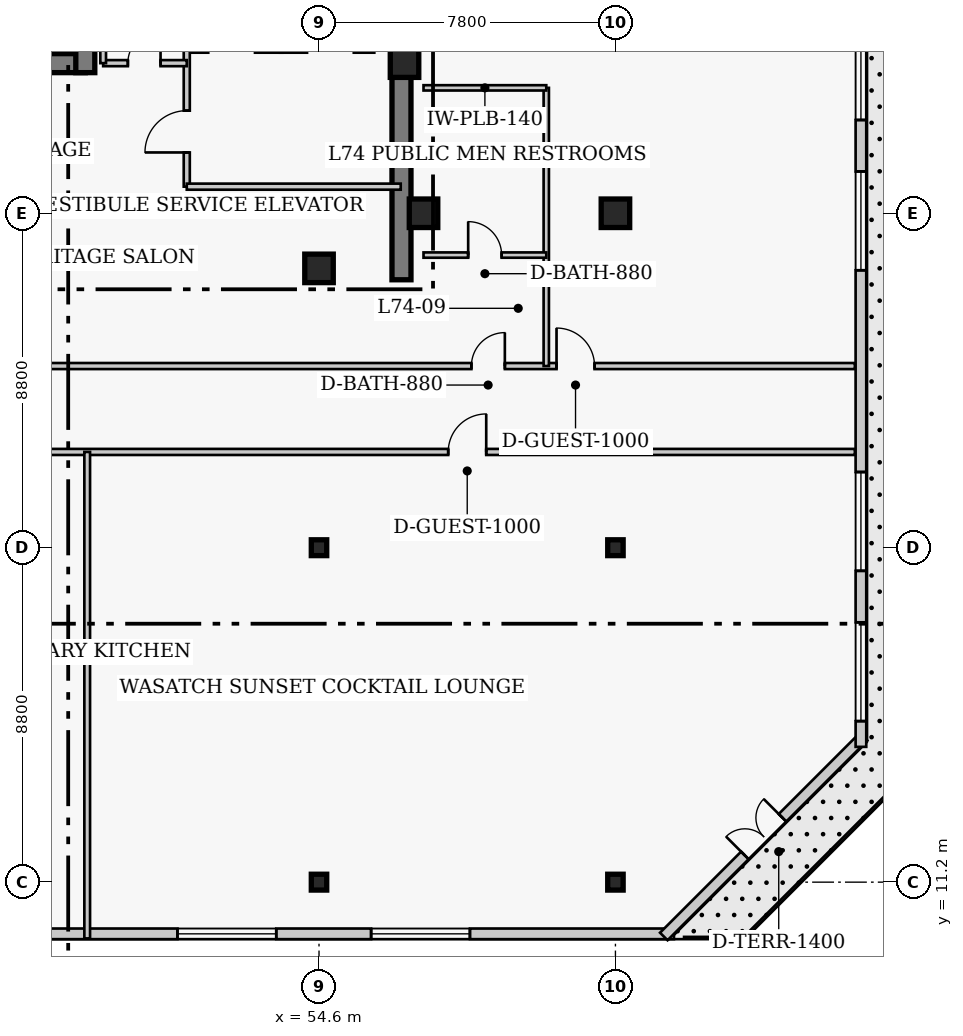
"""IFC4 building model, lengths in metres.
Left out: names, types, materials, properties, quantities, classifications, styles, units other than length and angle.
Written with IfcOpenShell. Run it as: python <this file> out.ifc"""

import sys

from ifc_helpers import new_model, si_unit, direction, frame, frame_2d, origin, origin_2d, place, context, subcontext, project, spatial, rectangle, i_section, extrude, element, fill, save


model = new_model("IFC4")
c1 = context("Model", 3, precision=1e-05, world=origin(), true_north=direction((0.0, 1.0)))
c2 = subcontext(c1, "Body", "Model", "MODEL_VIEW")
j1 = project(units=[si_unit("LENGTHUNIT", "METRE"), si_unit("PLANEANGLEUNIT", "RADIAN")], contexts=[c1])
p1 = place(None, origin())
s1 = spatial("IfcSite", under=j1, at=p1, CompositionType="ELEMENT")
p2 = place(p1, origin())
s2 = spatial("IfcBuilding", under=s1, at=p2, CompositionType="ELEMENT")
p3 = place(p2, frame((0.0, 0.0, 297.4)))
s3 = spatial("IfcBuildingStorey", under=s2, at=p3, CompositionType="ELEMENT", Elevation=297.4)
p4 = place(p3, frame((56.77, 27.05, 0.0), z_axis=(0.0, 0.0, 1.0), x_axis=(0.0, 1.0, 0.0)))
e1 = element("IfcWall", 1, at=p4, inside=s3, PredefinedType="SHEAR", context=c2, shape_type="SweptSolid", body=[
    extrude(rectangle(XDim=13.52, YDim=0.5, at=frame_2d((6.76, 0.0))), origin(), (0.0, 0.0, 1.0), 4.6),
])
p5 = place(p3, frame((45.81, 32.75, 0.0), z_axis=(0.0, 0.0, 1.0), x_axis=(1.0, 0.0, 0.0)))
e2 = element("IfcWall", 2, at=p5, inside=s3, PredefinedType="SHEAR", context=c2, shape_type="SweptSolid", body=[
    extrude(rectangle(XDim=2.64, YDim=0.5, at=frame_2d((1.32, 0.0))), origin(), (0.0, 0.0, 1.0), 4.6),
])
p6 = place(p3, frame((48.45, 32.5, 0.0), z_axis=(0.0, 0.0, 1.0), x_axis=(0.0, 1.0, 0.0)))
e3 = element("IfcWall", 3, at=p6, inside=s3, PredefinedType="SHEAR", context=c2, shape_type="SweptSolid", body=[
    extrude(rectangle(XDim=7.82, YDim=0.5, at=frame_2d((3.91, 0.0))), origin(), (0.0, 0.0, 1.0), 4.6),
])
p7 = place(p6, frame((5.7, 0.0, 0.0)))
e4 = element("IfcOpeningElement", 4, at=p7, cuts=e3, PredefinedType="OPENING", context=c2, shape_type="SweptSolid", body=[
    extrude(rectangle(XDim=1.1, YDim=2.15, at=frame_2d((0.55, 1.075))), frame((0.0, 0.26, 0.0), z_axis=(0.0, -1.0, 0.0), x_axis=(1.0, 0.0, 0.0)), (0.0, 0.0, 1.0), 0.52),
])
for number, where, z_axis, x_axis in (
    (5, (54.6, 11.2, 0.0), (0.0, 0.0, 1.0), (1.0, 0.0, 0.0)),
    (6, (54.6, 20.0, 0.0), (0.0, 0.0, 1.0), (1.0, 0.0, 0.0)),
    (7, (62.4, 11.2, 0.0), (0.0, 0.0, 1.0), (1.0, 0.0, 0.0)),
    (8, (62.4, 20.0, 0.0), (0.0, 0.0, 1.0), (1.0, 0.0, 0.0)),
):
    element("IfcColumn", number, at=place(p3, frame(where, z_axis=z_axis, x_axis=x_axis)), inside=s3, PredefinedType="COLUMN", context=c2, shape_type="SweptSolid", body=[
        extrude(i_section(OverallWidth=0.406, OverallDepth=0.417, WebThickness=0.03, FlangeThickness=0.048, FilletRadius=0.017, at=origin_2d()), origin(), (0.0, 0.0, 1.0), 4.6),
    ])
for number, where, z_axis, x_axis in (
    (9, (62.4, 28.8, 0.0), (0.0, 0.0, 1.0), (1.0, 0.0, 0.0)),
    (10, (57.35, 28.8, 0.0), (0.0, 0.0, 1.0), (1.0, 0.0, 0.0)),
    (11, (54.6, 27.35, 0.0), (0.0, 0.0, 1.0), (1.0, 0.0, 0.0)),
    (12, (56.85, 32.75, 0.0), (0.0, 0.0, 1.0), (1.0, 0.0, 0.0)),
):
    element("IfcColumn", number, at=place(p3, frame(where, z_axis=z_axis, x_axis=x_axis)), inside=s3, PredefinedType="COLUMN", context=c2, shape_type="SweptSolid", body=[
        extrude(rectangle(XDim=0.75, YDim=0.75, at=origin_2d()), origin(), (0.0, 0.0, 1.0), 4.6),
    ])
p8 = place(p3, frame((41.71, 9.84, 0.0), z_axis=(0.0, 0.0, 1.0), x_axis=(1.0, 0.0, 0.0)))
e13 = element("IfcWall", 13, at=p8, inside=s3, PredefinedType="SOLIDWALL", context=c2, shape_type="SweptSolid", body=[
    extrude(rectangle(XDim=22.23, YDim=0.28, at=frame_2d((11.115, 0.0))), origin(), (0.0, 0.0, 1.0), 4.31),
])
p9 = place(p8, frame((0.923, 0.0, 0.65)))
e14 = element("IfcOpeningElement", 14, at=p9, cuts=e13, PredefinedType="OPENING", context=c2, shape_type="SweptSolid", body=[
    extrude(rectangle(XDim=2.6, YDim=2.2, at=frame_2d((1.3, 1.1))), frame((0.0, 0.15, 0.0), z_axis=(0.0, -1.0, 0.0), x_axis=(1.0, 0.0, 0.0)), (0.0, 0.0, 1.0), 0.3),
])
p10 = place(p8, frame((9.165, 0.0, 0.65)))
e15 = element("IfcOpeningElement", 15, at=p10, cuts=e13, PredefinedType="OPENING", context=c2, shape_type="SweptSolid", body=[
    extrude(rectangle(XDim=2.6, YDim=2.2, at=frame_2d((1.3, 1.1))), frame((0.0, 0.15, 0.0), z_axis=(0.0, -1.0, 0.0), x_axis=(1.0, 0.0, 0.0)), (0.0, 0.0, 1.0), 0.3),
])
p11 = place(p8, frame((14.261, 0.0, 0.65)))
e16 = element("IfcOpeningElement", 16, at=p11, cuts=e13, PredefinedType="OPENING", context=c2, shape_type="SweptSolid", body=[
    extrude(rectangle(XDim=2.6, YDim=2.2, at=frame_2d((1.3, 1.1))), frame((0.0, 0.15, 0.0), z_axis=(0.0, -1.0, 0.0), x_axis=(1.0, 0.0, 0.0)), (0.0, 0.0, 1.0), 0.3),
])
p12 = place(p3, frame((63.673, 9.771, 0.0), z_axis=(0.0, 0.0, 1.0), x_axis=(0.707106781187, 0.707106781187, 0.0)))
e17 = element("IfcWall", 17, at=p12, inside=s3, PredefinedType="SOLIDWALL", context=c2, shape_type="SweptSolid", body=[
    extrude(rectangle(XDim=7.434, YDim=0.28, at=frame_2d((3.717, 0.0))), origin(), (0.0, 0.0, 1.0), 4.31),
])
p13 = place(p12, frame((3.017, 0.0, 0.0)))
e18 = element("IfcOpeningElement", 18, at=p13, cuts=e17, PredefinedType="OPENING", context=c2, shape_type="SweptSolid", body=[
    extrude(rectangle(XDim=1.4, YDim=2.15, at=frame_2d((0.7, 1.075))), frame((0.0, 0.15, 0.0), z_axis=(0.0, -1.0, 0.0), x_axis=(1.0, 0.0, 0.0)), (0.0, 0.0, 1.0), 0.3),
])
p14 = place(p3, frame((68.86, 14.76, 0.0), z_axis=(0.0, 0.0, 1.0), x_axis=(0.0, 1.0, 0.0)))
e19 = element("IfcWall", 19, at=p14, inside=s3, PredefinedType="SOLIDWALL", context=c2, shape_type="SweptSolid", body=[
    extrude(rectangle(XDim=27.68, YDim=0.28, at=frame_2d((13.84, 0.0))), origin(), (0.0, 0.0, 1.0), 4.31),
])
p15 = place(p14, frame((0.677, 0.0, 0.65)))
e20 = element("IfcOpeningElement", 20, at=p15, cuts=e19, PredefinedType="OPENING", context=c2, shape_type="SweptSolid", body=[
    extrude(rectangle(XDim=2.6, YDim=2.2, at=frame_2d((1.3, 1.1))), frame((0.0, 0.15, 0.0), z_axis=(0.0, -1.0, 0.0), x_axis=(1.0, 0.0, 0.0)), (0.0, 0.0, 1.0), 0.3),
])
p16 = place(p14, frame((4.631, 0.0, 0.65)))
e21 = element("IfcOpeningElement", 21, at=p16, cuts=e19, PredefinedType="OPENING", context=c2, shape_type="SweptSolid", body=[
    extrude(rectangle(XDim=2.6, YDim=2.2, at=frame_2d((1.3, 1.1))), frame((0.0, 0.15, 0.0), z_axis=(0.0, -1.0, 0.0), x_axis=(1.0, 0.0, 0.0)), (0.0, 0.0, 1.0), 0.3),
])
p17 = place(p14, frame((12.54, 0.0, 0.65)))
e22 = element("IfcOpeningElement", 22, at=p17, cuts=e19, PredefinedType="OPENING", context=c2, shape_type="SweptSolid", body=[
    extrude(rectangle(XDim=2.6, YDim=2.2, at=frame_2d((1.3, 1.1))), frame((0.0, 0.15, 0.0), z_axis=(0.0, -1.0, 0.0), x_axis=(1.0, 0.0, 0.0)), (0.0, 0.0, 1.0), 0.3),
])
p18 = place(p14, frame((16.494, 0.0, 0.65)))
e23 = element("IfcOpeningElement", 23, at=p18, cuts=e19, PredefinedType="OPENING", context=c2, shape_type="SweptSolid", body=[
    extrude(rectangle(XDim=2.6, YDim=2.2, at=frame_2d((1.3, 1.1))), frame((0.0, 0.15, 0.0), z_axis=(0.0, -1.0, 0.0), x_axis=(1.0, 0.0, 0.0)), (0.0, 0.0, 1.0), 0.3),
])
p19 = place(p14, frame((20.448, 0.0, 0.65)))
e24 = element("IfcOpeningElement", 24, at=p19, cuts=e19, PredefinedType="OPENING", context=c2, shape_type="SweptSolid", body=[
    extrude(rectangle(XDim=2.6, YDim=2.2, at=frame_2d((1.3, 1.1))), frame((0.0, 0.15, 0.0), z_axis=(0.0, -1.0, 0.0), x_axis=(1.0, 0.0, 0.0)), (0.0, 0.0, 1.0), 0.3),
])
p20 = place(p14, frame((24.403, 0.0, 0.65)))
e25 = element("IfcOpeningElement", 25, at=p20, cuts=e19, PredefinedType="OPENING", context=c2, shape_type="SweptSolid", body=[
    extrude(rectangle(XDim=2.6, YDim=2.2, at=frame_2d((1.3, 1.1))), frame((0.0, 0.15, 0.0), z_axis=(0.0, -1.0, 0.0), x_axis=(1.0, 0.0, 0.0)), (0.0, 0.0, 1.0), 0.3),
])
p21 = place(p3, frame((51.12, 29.5, 0.0), z_axis=(0.0, 0.0, 1.0), x_axis=(0.0, 1.0, 0.0)))
e26 = element("IfcWall", 26, at=p21, inside=s3, PredefinedType="PARTITIONING", context=c2, shape_type="SweptSolid", body=[
    extrude(rectangle(XDim=3.7, YDim=0.16, at=frame_2d((1.85, 0.0))), origin(), (0.0, 0.0, 1.0), 4.31),
])
p22 = place(p21, frame((0.9, 0.0, 0.0)))
e27 = element("IfcOpeningElement", 27, at=p22, cuts=e26, PredefinedType="OPENING", context=c2, shape_type="SweptSolid", body=[
    extrude(rectangle(XDim=1.1, YDim=2.15, at=frame_2d((0.55, 1.075))), frame((0.0, 0.09, 0.0), z_axis=(0.0, -1.0, 0.0), x_axis=(1.0, 0.0, 0.0)), (0.0, 0.0, 1.0), 0.18),
])
p23 = place(p3, frame((51.12, 29.5, 0.0), z_axis=(0.0, 0.0, 1.0), x_axis=(1.0, 0.0, 0.0)))
e28 = element("IfcWall", 28, at=p23, inside=s3, PredefinedType="PARTITIONING", context=c2, shape_type="SweptSolid", body=[
    extrude(rectangle(XDim=5.63, YDim=0.16, at=frame_2d((2.815, 0.0))), origin(), (0.0, 0.0, 1.0), 4.31),
])
p24 = place(p3, frame((48.92, 32.75, 0.0), z_axis=(0.0, 0.0, 1.0), x_axis=(1.0, 0.0, 0.0)))
e29 = element("IfcWall", 29, at=p24, inside=s3, PredefinedType="PARTITIONING", context=c2, shape_type="SweptSolid", body=[
    extrude(rectangle(XDim=2.2, YDim=0.16, at=frame_2d((1.1, 0.0))), origin(), (0.0, 0.0, 1.0), 4.31),
])
p25 = place(p24, frame((0.65, 0.0, 0.0)))
e30 = element("IfcOpeningElement", 30, at=p25, cuts=e29, PredefinedType="OPENING", context=c2, shape_type="SweptSolid", body=[
    extrude(rectangle(XDim=0.86, YDim=2.05, at=frame_2d((0.43, 1.025))), frame((0.0, 0.09, 0.0), z_axis=(0.0, -1.0, 0.0), x_axis=(1.0, 0.0, 0.0)), (0.0, 0.0, 1.0), 0.18),
])
p26 = place(p3, frame((48.92, 32.75, 0.0), z_axis=(0.0, 0.0, 1.0), x_axis=(0.0, 1.0, 0.0)))
e31 = element("IfcWall", 31, at=p26, inside=s3, PredefinedType="PARTITIONING", context=c2, shape_type="SweptSolid", body=[
    extrude(rectangle(XDim=3.62, YDim=0.15, at=frame_2d((1.81, 0.0))), origin(), (0.0, 0.0, 1.0), 4.31),
])
p27 = place(p3, frame((9.3, 22.52, 0.0), z_axis=(0.0, 0.0, 1.0), x_axis=(1.0, 0.0, 0.0)))
e32 = element("IfcWall", 32, at=p27, inside=s3, PredefinedType="PARTITIONING", context=c2, shape_type="SweptSolid", body=[
    extrude(rectangle(XDim=59.4, YDim=0.16, at=frame_2d((29.7, 0.0))), origin(), (0.0, 0.0, 1.0), 4.31),
])
p28 = place(p27, frame((11.7, 0.0, 0.0)))
e33 = element("IfcOpeningElement", 33, at=p28, cuts=e32, PredefinedType="OPENING", context=c2, shape_type="SweptSolid", body=[
    extrude(rectangle(XDim=1.0, YDim=2.15, at=frame_2d((0.5, 1.075))), frame((0.0, 0.09, 0.0), z_axis=(0.0, -1.0, 0.0), x_axis=(1.0, 0.0, 0.0)), (0.0, 0.0, 1.0), 0.18),
])
p29 = place(p27, frame((31.2, 0.0, 0.0)))
e34 = element("IfcOpeningElement", 34, at=p29, cuts=e32, PredefinedType="OPENING", context=c2, shape_type="SweptSolid", body=[
    extrude(rectangle(XDim=1.0, YDim=2.15, at=frame_2d((0.5, 1.075))), frame((0.0, 0.09, 0.0), z_axis=(0.0, -1.0, 0.0), x_axis=(1.0, 0.0, 0.0)), (0.0, 0.0, 1.0), 0.18),
])
p30 = place(p27, frame((48.7, 0.0, 0.0)))
e35 = element("IfcOpeningElement", 35, at=p30, cuts=e32, PredefinedType="OPENING", context=c2, shape_type="SweptSolid", body=[
    extrude(rectangle(XDim=1.0, YDim=2.15, at=frame_2d((0.5, 1.075))), frame((0.0, 0.09, 0.0), z_axis=(0.0, -1.0, 0.0), x_axis=(1.0, 0.0, 0.0)), (0.0, 0.0, 1.0), 0.18),
])
p31 = place(p3, frame((9.3, 24.78, 0.0), z_axis=(0.0, 0.0, 1.0), x_axis=(1.0, 0.0, 0.0)))
e36 = element("IfcWall", 36, at=p31, inside=s3, PredefinedType="PARTITIONING", context=c2, shape_type="SweptSolid", body=[
    extrude(rectangle(XDim=59.4, YDim=0.16, at=frame_2d((29.7, 0.0))), origin(), (0.0, 0.0, 1.0), 4.31),
])
p32 = place(p31, frame((27.8, 0.0, 0.0)))
e37 = element("IfcOpeningElement", 37, at=p32, cuts=e36, PredefinedType="OPENING", context=c2, shape_type="SweptSolid", body=[
    extrude(rectangle(XDim=1.8, YDim=2.2, at=frame_2d((0.9, 1.1))), frame((0.0, 0.09, 0.0), z_axis=(0.0, -1.0, 0.0), x_axis=(1.0, 0.0, 0.0)), (0.0, 0.0, 1.0), 0.18),
])
p33 = place(p31, frame((18.45, 0.0, 0.0)))
e38 = element("IfcOpeningElement", 38, at=p33, cuts=e36, PredefinedType="OPENING", context=c2, shape_type="SweptSolid", body=[
    extrude(rectangle(XDim=1.0, YDim=2.15, at=frame_2d((0.5, 1.075))), frame((0.0, 0.09, 0.0), z_axis=(0.0, -1.0, 0.0), x_axis=(1.0, 0.0, 0.0)), (0.0, 0.0, 1.0), 0.18),
])
p34 = place(p31, frame((35.7, 0.0, 0.0)))
e39 = element("IfcOpeningElement", 39, at=p34, cuts=e36, PredefinedType="OPENING", context=c2, shape_type="SweptSolid", body=[
    extrude(rectangle(XDim=1.0, YDim=2.15, at=frame_2d((0.5, 1.075))), frame((0.0, 0.09, 0.0), z_axis=(0.0, -1.0, 0.0), x_axis=(1.0, 0.0, 0.0)), (0.0, 0.0, 1.0), 0.18),
])
p35 = place(p31, frame((5.75, 0.0, 0.0)))
e40 = element("IfcOpeningElement", 40, at=p35, cuts=e36, PredefinedType="OPENING", context=c2, shape_type="SweptSolid", body=[
    extrude(rectangle(XDim=1.0, YDim=2.15, at=frame_2d((0.5, 1.075))), frame((0.0, 0.09, 0.0), z_axis=(0.0, -1.0, 0.0), x_axis=(1.0, 0.0, 0.0)), (0.0, 0.0, 1.0), 0.18),
])
p36 = place(p31, frame((49.31, 0.0, 0.0)))
e41 = element("IfcOpeningElement", 41, at=p36, cuts=e36, PredefinedType="OPENING", context=c2, shape_type="SweptSolid", body=[
    extrude(rectangle(XDim=0.88, YDim=2.05, at=frame_2d((0.44, 1.025))), frame((0.0, 0.09, 0.0), z_axis=(0.0, -1.0, 0.0), x_axis=(1.0, 0.0, 0.0)), (0.0, 0.0, 1.0), 0.18),
])
p37 = place(p31, frame((51.55, 0.0, 0.0)))
e42 = element("IfcOpeningElement", 42, at=p37, cuts=e36, PredefinedType="OPENING", context=c2, shape_type="SweptSolid", body=[
    extrude(rectangle(XDim=1.0, YDim=2.15, at=frame_2d((0.5, 1.075))), frame((0.0, 0.09, 0.0), z_axis=(0.0, -1.0, 0.0), x_axis=(1.0, 0.0, 0.0)), (0.0, 0.0, 1.0), 0.18),
])
p38 = place(p3, frame((48.5, 9.72, 0.0), z_axis=(0.0, 0.0, 1.0), x_axis=(0.0, 1.0, 0.0)))
e43 = element("IfcWall", 43, at=p38, inside=s3, PredefinedType="PARTITIONING", context=c2, shape_type="SweptSolid", body=[
    extrude(rectangle(XDim=12.8, YDim=0.15, at=frame_2d((6.4, 0.0))), origin(), (0.0, 0.0, 1.0), 3.906),
])
p39 = place(p3, frame((60.58, 24.78, 0.0), z_axis=(0.0, 0.0, 1.0), x_axis=(0.0, 1.0, 0.0)))
e44 = element("IfcWall", 44, at=p39, inside=s3, PredefinedType="PLUMBINGWALL", context=c2, shape_type="SweptSolid", body=[
    extrude(rectangle(XDim=7.32, YDim=0.14, at=frame_2d((3.66, 0.0))), origin(), (0.0, 0.0, 1.0), 4.31),
])
p40 = place(p3, frame((57.35, 27.7, 0.0), z_axis=(0.0, 0.0, 1.0), x_axis=(1.0, 0.0, 0.0)))
e45 = element("IfcWall", 45, at=p40, inside=s3, PredefinedType="PLUMBINGWALL", context=c2, shape_type="SweptSolid", body=[
    extrude(rectangle(XDim=3.23, YDim=0.14, at=frame_2d((1.615, 0.0))), origin(), (0.0, 0.0, 1.0), 4.31),
])
p41 = place(p40, frame((1.175, 0.0, 0.0)))
e46 = element("IfcOpeningElement", 46, at=p41, cuts=e45, PredefinedType="OPENING", context=c2, shape_type="SweptSolid", body=[
    extrude(rectangle(XDim=0.88, YDim=2.05, at=frame_2d((0.44, 1.025))), frame((0.0, 0.08, 0.0), z_axis=(0.0, -1.0, 0.0), x_axis=(1.0, 0.0, 0.0)), (0.0, 0.0, 1.0), 0.16),
])
p42 = place(p3, frame((57.35, 32.1, 0.0), z_axis=(0.0, 0.0, 1.0), x_axis=(1.0, 0.0, 0.0)))
e47 = element("IfcWall", 47, at=p42, inside=s3, PredefinedType="PLUMBINGWALL", context=c2, shape_type="SweptSolid", body=[
    extrude(rectangle(XDim=3.23, YDim=0.14, at=frame_2d((1.615, 0.0))), origin(), (0.0, 0.0, 1.0), 4.31),
])
p43 = place(p10, origin())
e48 = element("IfcWindow", 48, at=p43, inside=s3, PartitioningType="SINGLE_PANEL", PredefinedType="WINDOW", context=c2, shape_type="SweptSolid", body=[
    extrude(rectangle(XDim=2.6, YDim=2.2, at=frame_2d((1.3, 1.1))), frame((0.0, 0.03, 0.0), z_axis=(0.0, -1.0, 0.0), x_axis=(1.0, 0.0, 0.0)), (0.0, 0.0, 1.0), 0.06),
])
fill(e15, e48)
p44 = place(p11, origin())
e49 = element("IfcWindow", 49, at=p44, inside=s3, PartitioningType="SINGLE_PANEL", PredefinedType="WINDOW", context=c2, shape_type="SweptSolid", body=[
    extrude(rectangle(XDim=2.6, YDim=2.2, at=frame_2d((1.3, 1.1))), frame((0.0, 0.03, 0.0), z_axis=(0.0, -1.0, 0.0), x_axis=(1.0, 0.0, 0.0)), (0.0, 0.0, 1.0), 0.06),
])
fill(e16, e49)
p45 = place(p13, origin())
e50 = element("IfcDoor", 50, at=p45, inside=s3, OperationType="DOUBLE_DOOR_SINGLE_SWING", PredefinedType="DOOR", context=c2, shape_type="SweptSolid", body=[
    extrude(rectangle(XDim=1.4, YDim=2.15, at=frame_2d((0.7, 1.075))), frame((0.0, 0.025, 0.0), z_axis=(0.0, -1.0, 0.0), x_axis=(1.0, 0.0, 0.0)), (0.0, 0.0, 1.0), 0.05),
])
fill(e18, e50)
p46 = place(p15, origin())
e51 = element("IfcWindow", 51, at=p46, inside=s3, PartitioningType="SINGLE_PANEL", PredefinedType="WINDOW", context=c2, shape_type="SweptSolid", body=[
    extrude(rectangle(XDim=2.6, YDim=2.2, at=frame_2d((1.3, 1.1))), frame((0.0, 0.03, 0.0), z_axis=(0.0, -1.0, 0.0), x_axis=(1.0, 0.0, 0.0)), (0.0, 0.0, 1.0), 0.06),
])
fill(e20, e51)
p47 = place(p16, origin())
e52 = element("IfcWindow", 52, at=p47, inside=s3, PartitioningType="SINGLE_PANEL", PredefinedType="WINDOW", context=c2, shape_type="SweptSolid", body=[
    extrude(rectangle(XDim=2.6, YDim=2.2, at=frame_2d((1.3, 1.1))), frame((0.0, 0.03, 0.0), z_axis=(0.0, -1.0, 0.0), x_axis=(1.0, 0.0, 0.0)), (0.0, 0.0, 1.0), 0.06),
])
fill(e21, e52)
p48 = place(p17, origin())
e53 = element("IfcWindow", 53, at=p48, inside=s3, PartitioningType="SINGLE_PANEL", PredefinedType="WINDOW", context=c2, shape_type="SweptSolid", body=[
    extrude(rectangle(XDim=2.6, YDim=2.2, at=frame_2d((1.3, 1.1))), frame((0.0, 0.03, 0.0), z_axis=(0.0, -1.0, 0.0), x_axis=(1.0, 0.0, 0.0)), (0.0, 0.0, 1.0), 0.06),
])
fill(e22, e53)
p49 = place(p18, origin())
e54 = element("IfcWindow", 54, at=p49, inside=s3, PartitioningType="SINGLE_PANEL", PredefinedType="WINDOW", context=c2, shape_type="SweptSolid", body=[
    extrude(rectangle(XDim=2.6, YDim=2.2, at=frame_2d((1.3, 1.1))), frame((0.0, 0.03, 0.0), z_axis=(0.0, -1.0, 0.0), x_axis=(1.0, 0.0, 0.0)), (0.0, 0.0, 1.0), 0.06),
])
fill(e23, e54)
p50 = place(p22, origin())
e55 = element("IfcDoor", 55, at=p50, inside=s3, OperationType="SINGLE_SWING_LEFT", PredefinedType="DOOR", context=c2, shape_type="SweptSolid", body=[
    extrude(rectangle(XDim=1.1, YDim=2.15, at=frame_2d((0.55, 1.075))), frame((0.0, 0.025, 0.0), z_axis=(0.0, -1.0, 0.0), x_axis=(1.0, 0.0, 0.0)), (0.0, 0.0, 1.0), 0.05),
])
fill(e27, e55)
p51 = place(p25, origin())
e56 = element("IfcDoor", 56, at=p51, inside=s3, OperationType="SINGLE_SWING_RIGHT", PredefinedType="DOOR", context=c2, shape_type="SweptSolid", body=[
    extrude(rectangle(XDim=0.86, YDim=2.05, at=frame_2d((0.43, 1.025))), frame((0.0, 0.025, 0.0), z_axis=(0.0, -1.0, 0.0), x_axis=(1.0, 0.0, 0.0)), (0.0, 0.0, 1.0), 0.05),
])
fill(e30, e56)
p52 = place(p30, origin())
e57 = element("IfcDoor", 57, at=p52, inside=s3, OperationType="SINGLE_SWING_RIGHT", PredefinedType="DOOR", context=c2, shape_type="SweptSolid", body=[
    extrude(rectangle(XDim=1.0, YDim=2.15, at=frame_2d((0.5, 1.075))), frame((0.0, 0.025, 0.0), z_axis=(0.0, -1.0, 0.0), x_axis=(1.0, 0.0, 0.0)), (0.0, 0.0, 1.0), 0.05),
])
fill(e35, e57)
p53 = place(p36, origin())
e58 = element("IfcDoor", 58, at=p53, inside=s3, OperationType="SINGLE_SWING_RIGHT", PredefinedType="DOOR", context=c2, shape_type="SweptSolid", body=[
    extrude(rectangle(XDim=0.88, YDim=2.05, at=frame_2d((0.44, 1.025))), frame((0.0, 0.025, 0.0), z_axis=(0.0, -1.0, 0.0), x_axis=(1.0, 0.0, 0.0)), (0.0, 0.0, 1.0), 0.05),
])
fill(e41, e58)
p54 = place(p41, origin())
e59 = element("IfcDoor", 59, at=p54, inside=s3, OperationType="SINGLE_SWING_LEFT", PredefinedType="DOOR", context=c2, shape_type="SweptSolid", body=[
    extrude(rectangle(XDim=0.88, YDim=2.05, at=frame_2d((0.44, 1.025))), frame((0.0, 0.025, 0.0), z_axis=(0.0, -1.0, 0.0), x_axis=(1.0, 0.0, 0.0)), (0.0, 0.0, 1.0), 0.05),
])
fill(e46, e59)
p55 = place(p37, origin())
e60 = element("IfcDoor", 60, at=p55, inside=s3, OperationType="SINGLE_SWING_LEFT", PredefinedType="DOOR", context=c2, shape_type="SweptSolid", body=[
    extrude(rectangle(XDim=1.0, YDim=2.15, at=frame_2d((0.5, 1.075))), frame((0.0, 0.025, 0.0), z_axis=(0.0, -1.0, 0.0), x_axis=(1.0, 0.0, 0.0)), (0.0, 0.0, 1.0), 0.05),
])
fill(e42, e60)
save(model, sys.argv[1])
